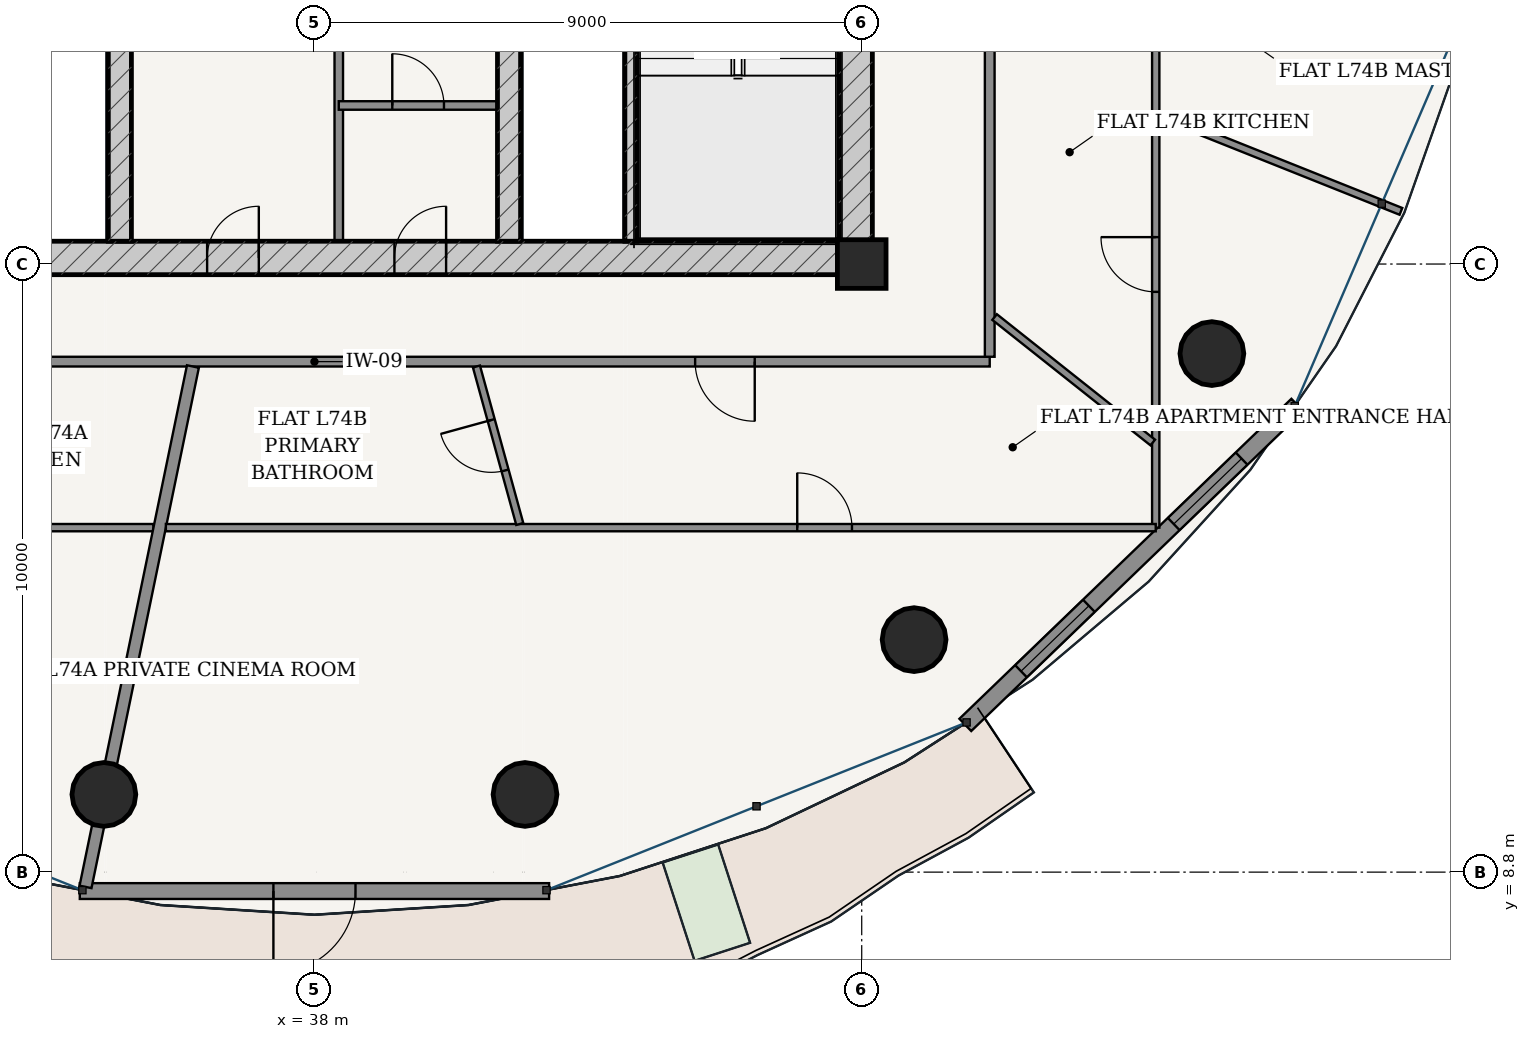
"""IFC4 building model, lengths in metres.
Left out: names, types, materials, properties, quantities, classifications, styles, units other than length and angle.
Written with IfcOpenShell. Run it as: python <this file> out.ifc"""

import sys

from ifc_helpers import new_model, si_unit, direction, frame, frame_2d, origin, origin_2d, place, context, subcontext, project, spatial, rectangle, hollow_circle, extrude, source, transform, mapped, element, fill, save


model = new_model("IFC4")
c1 = context("Model", 3, precision=1e-05, world=origin(), true_north=direction((-0.2419218956, 0.970295726276)))
c2 = subcontext(c1, "Body", "Model", "MODEL_VIEW")
j1 = project(units=[si_unit("LENGTHUNIT", "METRE"), si_unit("PLANEANGLEUNIT", "RADIAN")], contexts=[c1])
p1 = place(None, origin())
s1 = spatial("IfcSite", under=j1, at=p1, CompositionType="ELEMENT")
p2 = place(p1, origin())
s2 = spatial("IfcBuilding", under=s1, at=p2, CompositionType="ELEMENT")
p3 = place(p2, frame((0.0, 0.0, 281.95)))
s3 = spatial("IfcBuildingStorey", under=s2, at=p3, CompositionType="ELEMENT", Elevation=281.95)
p4 = place(p3, frame((47.0, 18.8, 0.0), z_axis=(0.0, 0.0, 1.0), x_axis=(1.0, 0.0, 0.0)))
e1 = element("IfcColumn", 1, at=p4, inside=s3, PredefinedType="COLUMN", context=c2, shape_type="SweptSolid", body=[
    extrude(rectangle(XDim=0.8, YDim=0.8, at=origin_2d()), origin(), (0.0, 0.0, 1.0), 3.75),
])
p5 = place(p3, frame((28.825, 18.9, 0.0), z_axis=(0.0, 0.0, 1.0), x_axis=(1.0, 0.0, 0.0)))
e2 = element("IfcWall", 2, at=p5, inside=s3, PredefinedType="SHEAR", context=c2, shape_type="SweptSolid", body=[
    extrude(rectangle(XDim=18.35, YDim=0.55, at=frame_2d((9.175, 0.0))), origin(), (0.0, 0.0, 1.0), 3.49),
])
p6 = place(p5, frame((7.41, 0.0, 0.0)))
e3 = element("IfcOpeningElement", 3, at=p6, cuts=e2, PredefinedType="OPENING", context=c2, shape_type="SweptSolid", body=[
    extrude(rectangle(XDim=0.85, YDim=2.1, at=frame_2d((0.425, 1.05))), frame((0.0, 0.285, 0.0), z_axis=(0.0, -1.0, 0.0), x_axis=(1.0, 0.0, 0.0)), (0.0, 0.0, 1.0), 0.57),
])
p7 = place(p5, frame((10.49, 0.0, 0.0)))
e4 = element("IfcOpeningElement", 4, at=p7, cuts=e2, PredefinedType="OPENING", context=c2, shape_type="SweptSolid", body=[
    extrude(rectangle(XDim=0.85, YDim=2.1, at=frame_2d((0.425, 1.05))), frame((0.0, 0.285, 0.0), z_axis=(0.0, -1.0, 0.0), x_axis=(1.0, 0.0, 0.0)), (0.0, 0.0, 1.0), 0.57),
])
p8 = place(p3, frame((46.9, 19.175, 0.0), z_axis=(0.0, 0.0, 1.0), x_axis=(0.0, 1.0, 0.0)))
e5 = element("IfcWall", 5, at=p8, inside=s3, PredefinedType="SHEAR", context=c2, shape_type="SweptSolid", body=[
    extrude(rectangle(XDim=15.25, YDim=0.55, at=frame_2d((7.625, 0.0))), origin(), (0.0, 0.0, 1.0), 3.49),
])
p9 = place(p8, frame((9.875, 0.0, 0.0)))
e6 = element("IfcOpeningElement", 6, at=p9, cuts=e5, PredefinedType="OPENING", context=c2, shape_type="SweptSolid", body=[
    extrude(rectangle(XDim=1.5, YDim=2.2, at=frame_2d((0.75, 1.1))), frame((0.0, 0.285, 0.0), z_axis=(0.0, -1.0, 0.0), x_axis=(1.0, 0.0, 0.0)), (0.0, 0.0, 1.0), 0.57),
])
p10 = place(p3, frame((43.205, 19.175, 0.0), z_axis=(0.0, 0.0, 1.0), x_axis=(0.0, 1.0, 0.0)))
e7 = element("IfcWall", 7, at=p10, inside=s3, PredefinedType="SOLIDWALL", context=c2, shape_type="SweptSolid", body=[
    extrude(rectangle(XDim=7.375, YDim=0.2, at=frame_2d((3.688, 0.0))), origin(), (0.0, 0.0, 1.0), 3.49),
])
p11 = place(p3, frame((34.8, 19.175, 0.0), z_axis=(0.0, 0.0, 1.0), x_axis=(0.0, 1.0, 0.0)))
e8 = element("IfcWall", 8, at=p11, inside=s3, PredefinedType="SHEAR", context=c2, shape_type="SweptSolid", body=[
    extrude(rectangle(XDim=15.25, YDim=0.38, at=frame_2d((7.625, 0.0))), origin(), (0.0, 0.0, 1.0), 3.49),
])
p12 = place(p11, frame((7.8, 0.0, 0.0)))
e9 = element("IfcOpeningElement", 9, at=p12, cuts=e8, PredefinedType="OPENING", context=c2, shape_type="SweptSolid", body=[
    extrude(rectangle(XDim=1.05, YDim=2.15, at=frame_2d((0.525, 1.075))), frame((0.0, 0.2, 0.0), z_axis=(0.0, -1.0, 0.0), x_axis=(1.0, 0.0, 0.0)), (0.0, 0.0, 1.0), 0.4),
])
p13 = place(p3, frame((41.2, 19.175, 0.0), z_axis=(0.0, 0.0, 1.0), x_axis=(0.0, 1.0, 0.0)))
e10 = element("IfcWall", 10, at=p13, inside=s3, PredefinedType="SHEAR", context=c2, shape_type="SweptSolid", body=[
    extrude(rectangle(XDim=15.25, YDim=0.38, at=frame_2d((7.625, 0.0))), origin(), (0.0, 0.0, 1.0), 3.49),
])
p14 = place(p13, frame((7.8, 0.0, 0.0)))
e11 = element("IfcOpeningElement", 11, at=p14, cuts=e10, PredefinedType="OPENING", context=c2, shape_type="SweptSolid", body=[
    extrude(rectangle(XDim=1.05, YDim=2.15, at=frame_2d((0.525, 1.075))), frame((0.0, 0.2, 0.0), z_axis=(0.0, -1.0, 0.0), x_axis=(1.0, 0.0, 0.0)), (0.0, 0.0, 1.0), 0.4),
])
for number, where, z_axis, x_axis in (
    (12, (34.537, 10.078, 0.0), (0.0, 0.0, 1.0), (1.0, 0.0, 0.0)),
    (13, (41.463, 10.078, 0.0), (0.0, 0.0, 1.0), (1.0, 0.0, 0.0)),
    (14, (47.861, 12.624, 0.0), (0.0, 0.0, 1.0), (1.0, 0.0, 0.0)),
    (15, (52.759, 17.328, 0.0), (0.0, 0.0, 1.0), (1.0, 0.0, 0.0)),
):
    element("IfcColumn", number, at=place(p3, frame(where, z_axis=z_axis, x_axis=x_axis)), inside=s3, PredefinedType="COLUMN", context=c2, shape_type="SweptSolid", body=[
        extrude(hollow_circle(Radius=0.525, WallThickness=0.035, at=origin_2d()), origin(), (0.0, 0.0, 1.0), 3.75),
    ])
p15 = place(p3, frame((34.141, 8.489, 0.0), z_axis=(0.0, 0.0, 1.0), x_axis=(1.0, 0.0, 0.0)))
e16 = element("IfcWall", 16, at=p15, inside=s3, PredefinedType="SOLIDWALL", context=c2, shape_type="SweptSolid", body=[
    extrude(rectangle(XDim=7.718, YDim=0.26, at=frame_2d((3.859, 0.0))), origin(), (0.0, 0.0, 1.0), 3.49),
])
p16 = place(p15, frame((3.184, 0.0, 0.0)))
e17 = element("IfcOpeningElement", 17, at=p16, cuts=e16, PredefinedType="OPENING", context=c2, shape_type="SweptSolid", body=[
    extrude(rectangle(XDim=1.35, YDim=2.2, at=frame_2d((0.675, 1.1))), frame((0.0, 0.14, 0.0), z_axis=(0.0, -1.0, 0.0), x_axis=(1.0, 0.0, 0.0)), (0.0, 0.0, 1.0), 0.28),
])
p17 = place(p3, frame((48.704, 11.221, 0.0), z_axis=(0.0, 0.0, 1.0), x_axis=(0.719995397366, 0.69397883813, 0.0)))
e18 = element("IfcWall", 18, at=p17, inside=s3, PredefinedType="SOLIDWALL", context=c2, shape_type="SweptSolid", body=[
    extrude(rectangle(XDim=7.582, YDim=0.28, at=frame_2d((3.791, 0.0))), origin(), (0.0, 0.0, 1.0), 3.49),
])
p18 = place(p17, frame((1.272, 0.0, 0.85)))
e19 = element("IfcOpeningElement", 19, at=p18, cuts=e18, PredefinedType="OPENING", context=c2, shape_type="SweptSolid", body=[
    extrude(rectangle(XDim=1.55, YDim=1.95, at=frame_2d((0.775, 0.975))), frame((0.0, 0.15, 0.0), z_axis=(0.0, -1.0, 0.0), x_axis=(1.0, 0.0, 0.0)), (0.0, 0.0, 1.0), 0.3),
])
p19 = place(p17, frame((4.76, 0.0, 0.85)))
e20 = element("IfcOpeningElement", 20, at=p19, cuts=e18, PredefinedType="OPENING", context=c2, shape_type="SweptSolid", body=[
    extrude(rectangle(XDim=1.55, YDim=1.95, at=frame_2d((0.775, 0.975))), frame((0.0, 0.15, 0.0), z_axis=(0.0, -1.0, 0.0), x_axis=(1.0, 0.0, 0.0)), (0.0, 0.0, 1.0), 0.3),
])
p20 = place(p3, frame((38.4, 19.175, 0.0), z_axis=(0.0, 0.0, 1.0), x_axis=(0.0, 1.0, 0.0)))
e21 = element("IfcWall", 21, at=p20, inside=s3, PredefinedType="PARTITIONING", context=c2, shape_type="SweptSolid", body=[
    extrude(rectangle(XDim=4.465, YDim=0.14, at=frame_2d((2.232, 0.0))), origin(), (0.0, 0.0, 1.0), 3.49),
])
p21 = place(p3, frame((38.4, 21.407, 0.0), z_axis=(0.0, 0.0, 1.0), x_axis=(1.0, 0.0, 0.0)))
e22 = element("IfcWall", 22, at=p21, inside=s3, PredefinedType="PARTITIONING", context=c2, shape_type="SweptSolid", body=[
    extrude(rectangle(XDim=2.61, YDim=0.14, at=frame_2d((1.305, 0.0))), origin(), (0.0, 0.0, 1.0), 3.49),
])
p22 = place(p21, frame((0.88, 0.0, 0.0)))
e23 = element("IfcOpeningElement", 23, at=p22, cuts=e22, PredefinedType="OPENING", context=c2, shape_type="SweptSolid", body=[
    extrude(rectangle(XDim=0.85, YDim=2.1, at=frame_2d((0.425, 1.05))), frame((0.0, 0.08, 0.0), z_axis=(0.0, -1.0, 0.0), x_axis=(1.0, 0.0, 0.0)), (0.0, 0.0, 1.0), 0.16),
])
p23 = place(p3, frame((26.895, 17.195, 0.0), z_axis=(0.0, 0.0, 1.0), x_axis=(1.0, 0.0, 0.0)))
e24 = element("IfcWall", 24, at=p23, inside=s3, PredefinedType="PARTITIONING", context=c2, shape_type="SweptSolid", body=[
    extrude(rectangle(XDim=22.21, YDim=0.16, at=frame_2d((11.105, 0.0))), origin(), (0.0, 0.0, 1.0), 3.015),
])
p24 = place(p23, frame((17.365, 0.0, 0.0)))
e25 = element("IfcOpeningElement", 25, at=p24, cuts=e24, PredefinedType="OPENING", context=c2, shape_type="SweptSolid", body=[
    extrude(rectangle(XDim=0.98, YDim=2.2, at=frame_2d((0.49, 1.1))), frame((0.0, 0.09, 0.0), z_axis=(0.0, -1.0, 0.0), x_axis=(1.0, 0.0, 0.0)), (0.0, 0.0, 1.0), 0.18),
])
p25 = place(p3, frame((49.105, 17.275, 0.0), z_axis=(0.0, 0.0, 1.0), x_axis=(0.0, 1.0, 0.0)))
e26 = element("IfcWall", 26, at=p25, inside=s3, PredefinedType="PARTITIONING", context=c2, shape_type="SweptSolid", body=[
    extrude(rectangle(XDim=13.925, YDim=0.16, at=frame_2d((6.962, 0.0))), origin(), (0.0, 0.0, 1.0), 3.015),
])
p26 = place(p3, frame((35.353, 14.465, 0.0), z_axis=(0.0, 0.0, 1.0), x_axis=(-1.0, 0.0, 0.0)))
e27 = element("IfcWall", 27, at=p26, inside=s3, PredefinedType="PARTITIONING", context=c2, shape_type="SweptSolid", body=[
    extrude(rectangle(XDim=11.188, YDim=0.12, at=frame_2d((5.594, 0.0))), origin(), (0.0, 0.0, 1.0), 3.015),
])
p27 = place(p26, frame((3.997, 0.0, 0.0)))
e28 = element("IfcOpeningElement", 28, at=p27, cuts=e27, PredefinedType="OPENING", context=c2, shape_type="SweptSolid", body=[
    extrude(rectangle(XDim=0.9, YDim=2.15, at=frame_2d((0.45, 1.075))), frame((0.0, 0.07, 0.0), z_axis=(0.0, -1.0, 0.0), x_axis=(1.0, 0.0, 0.0)), (0.0, 0.0, 1.0), 0.14),
])
p28 = place(p3, frame((36.001, 17.115, 0.0), z_axis=(0.0, 0.0, 1.0), x_axis=(-0.202108543081, -0.979363128167, 0.0)))
e29 = element("IfcWall", 29, at=p28, inside=s3, PredefinedType="PARTITIONING", context=c2, shape_type="SweptSolid", body=[
    extrude(rectangle(XDim=8.739, YDim=0.2, at=frame_2d((4.369, 0.0))), origin(), (0.0, 0.0, 1.0), 3.015),
])
p29 = place(p3, frame((51.835, 34.01, 0.0), z_axis=(0.0, 0.0, 1.0), x_axis=(0.0, -1.0, 0.0)))
e30 = element("IfcWall", 30, at=p29, inside=s3, PredefinedType="PARTITIONING", context=c2, shape_type="SweptSolid", body=[
    extrude(rectangle(XDim=19.545, YDim=0.12, at=frame_2d((9.772, 0.0))), origin(), (0.0, 0.0, 1.0), 3.015),
])
p30 = place(p29, frame((14.768, 0.0, 0.0)))
e31 = element("IfcOpeningElement", 31, at=p30, cuts=e30, PredefinedType="OPENING", context=c2, shape_type="SweptSolid", body=[
    extrude(rectangle(XDim=0.9, YDim=2.15, at=frame_2d((0.45, 1.075))), frame((0.0, 0.07, 0.0), z_axis=(0.0, -1.0, 0.0), x_axis=(1.0, 0.0, 0.0)), (0.0, 0.0, 1.0), 0.14),
])
p31 = place(p29, frame((8.718, 0.0, 0.0)))
e32 = element("IfcOpeningElement", 32, at=p31, cuts=e30, PredefinedType="OPENING", context=c2, shape_type="SweptSolid", body=[
    extrude(rectangle(XDim=0.9, YDim=2.15, at=frame_2d((0.45, 1.075))), frame((0.0, 0.07, 0.0), z_axis=(0.0, -1.0, 0.0), x_axis=(1.0, 0.0, 0.0)), (0.0, 0.0, 1.0), 0.14),
])
p32 = place(p29, frame((4.14, 0.0, 0.0)))
e33 = element("IfcOpeningElement", 33, at=p32, cuts=e30, PredefinedType="OPENING", context=c2, shape_type="SweptSolid", body=[
    extrude(rectangle(XDim=0.9, YDim=2.15, at=frame_2d((0.45, 1.075))), frame((0.0, 0.07, 0.0), z_axis=(0.0, -1.0, 0.0), x_axis=(1.0, 0.0, 0.0)), (0.0, 0.0, 1.0), 0.14),
])
p33 = place(p3, frame((51.835, 14.465, 0.0), z_axis=(0.0, 0.0, 1.0), x_axis=(-1.0, 0.0, 0.0)))
e34 = element("IfcWall", 34, at=p33, inside=s3, PredefinedType="PARTITIONING", context=c2, shape_type="SweptSolid", body=[
    extrude(rectangle(XDim=16.278, YDim=0.12, at=frame_2d((8.139, 0.0))), origin(), (0.0, 0.0, 1.0), 3.015),
])
p34 = place(p33, frame((4.996, 0.0, 0.0)))
e35 = element("IfcOpeningElement", 35, at=p34, cuts=e34, PredefinedType="OPENING", context=c2, shape_type="SweptSolid", body=[
    extrude(rectangle(XDim=0.9, YDim=2.15, at=frame_2d((0.45, 1.075))), frame((0.0, 0.07, 0.0), z_axis=(0.0, -1.0, 0.0), x_axis=(1.0, 0.0, 0.0)), (0.0, 0.0, 1.0), 0.14),
])
p35 = place(p3, frame((51.893, 21.253, 0.0), z_axis=(0.0, 0.0, 1.0), x_axis=(0.928712556691, -0.370800467966, 0.0)))
e36 = element("IfcWall", 36, at=p35, inside=s3, PredefinedType="PARTITIONING", context=c2, shape_type="SweptSolid", body=[
    extrude(rectangle(XDim=4.28, YDim=0.12, at=frame_2d((2.14, 0.0))), origin(), (0.0, 0.0, 1.0), 3.121),
])
p36 = place(p3, frame((40.664, 17.115, 0.0), z_axis=(0.0, 0.0, 1.0), x_axis=(0.265177604745, -0.964199584081, 0.0)))
e37 = element("IfcWall", 37, at=p36, inside=s3, PredefinedType="PARTITIONING", context=c2, shape_type="SweptSolid", body=[
    extrude(rectangle(XDim=2.687, YDim=0.12, at=frame_2d((1.343, 0.0))), origin(), (0.0, 0.0, 1.0), 3.209),
])
p37 = place(p36, frame((0.913, 0.0, 0.0)))
e38 = element("IfcOpeningElement", 38, at=p37, cuts=e37, PredefinedType="OPENING", context=c2, shape_type="SweptSolid", body=[
    extrude(rectangle(XDim=0.86, YDim=2.15, at=frame_2d((0.43, 1.075))), frame((0.0, 0.07, 0.0), z_axis=(0.0, -1.0, 0.0), x_axis=(1.0, 0.0, 0.0)), (0.0, 0.0, 1.0), 0.14),
])
p38 = place(p3, frame((49.185, 17.928, 0.0), z_axis=(0.0, 0.0, 1.0), x_axis=(0.78348039615, -0.621416501912, 0.0)))
e39 = element("IfcWall", 39, at=p38, inside=s3, PredefinedType="PARTITIONING", context=c2, shape_type="SweptSolid", body=[
    extrude(rectangle(XDim=3.32, YDim=0.12, at=frame_2d((1.66, 0.0))), origin(), (0.0, 0.0, 1.0), 3.121),
])
m1 = source(origin(), c2, "Body", "SweptSolid", [
    extrude(rectangle(XDim=1.35, YDim=2.2, at=frame_2d((0.675, 1.1))), frame((0.0, 0.025, 0.0), z_axis=(0.0, -1.0, 0.0), x_axis=(1.0, 0.0, 0.0)), (0.0, 0.0, 1.0), 0.05),
])
p39 = place(p16, frame((1.35, 0.0, 0.0), z_axis=(0.0, 0.0, 1.0), x_axis=(-1.0, 0.0, 0.0)))
e40 = element("IfcDoor", 40, at=p39, inside=s3, OperationType="SINGLE_SWING_RIGHT", PredefinedType="DOOR", context=c2, shape_type="MappedRepresentation", body=[
    mapped(m1, transform((0.0, 0.0, 0.0), scale=1.0)),
])
fill(e17, e40)
m2 = source(origin(), c2, "Body", "SweptSolid", [
    extrude(rectangle(XDim=1.55, YDim=1.95, at=frame_2d((0.775, 0.975))), frame((0.0, 0.03, 0.0), z_axis=(0.0, -1.0, 0.0), x_axis=(1.0, 0.0, 0.0)), (0.0, 0.0, 1.0), 0.06),
])
p40 = place(p18, origin())
e41 = element("IfcWindow", 41, at=p40, inside=s3, PartitioningType="SINGLE_PANEL", PredefinedType="WINDOW", context=c2, shape_type="MappedRepresentation", body=[
    mapped(m2, transform((0.0, 0.0, 0.0), scale=1.0)),
])
fill(e19, e41)
p41 = place(p19, origin())
e42 = element("IfcWindow", 42, at=p41, inside=s3, PartitioningType="SINGLE_PANEL", PredefinedType="WINDOW", context=c2, shape_type="MappedRepresentation", body=[
    mapped(m2, transform((0.0, 0.0, 0.0), scale=1.0)),
])
fill(e20, e42)
m3 = source(origin(), c2, "Body", "SweptSolid", [
    extrude(rectangle(XDim=0.85, YDim=2.1, at=frame_2d((0.425, 1.05))), frame((0.0, 0.025, 0.0), z_axis=(0.0, -1.0, 0.0), x_axis=(1.0, 0.0, 0.0)), (0.0, 0.0, 1.0), 0.05),
])
p42 = place(p6, origin())
e43 = element("IfcDoor", 43, at=p42, inside=s3, OperationType="SINGLE_SWING_RIGHT", PredefinedType="DOOR", context=c2, shape_type="MappedRepresentation", body=[
    mapped(m3, transform((0.0, 0.0, 0.0), scale=1.0)),
])
fill(e3, e43)
p43 = place(p7, origin())
e44 = element("IfcDoor", 44, at=p43, inside=s3, OperationType="SINGLE_SWING_RIGHT", PredefinedType="DOOR", context=c2, shape_type="MappedRepresentation", body=[
    mapped(m3, transform((0.0, 0.0, 0.0), scale=1.0)),
])
fill(e4, e44)
p44 = place(p22, origin())
e45 = element("IfcDoor", 45, at=p44, inside=s3, OperationType="SINGLE_SWING_LEFT", PredefinedType="DOOR", context=c2, shape_type="MappedRepresentation", body=[
    mapped(m3, transform((0.0, 0.0, 0.0), scale=1.0)),
])
fill(e23, e45)
m4 = source(origin(), c2, "Body", "SweptSolid", [
    extrude(rectangle(XDim=0.98, YDim=2.2, at=frame_2d((0.49, 1.1))), frame((0.0, 0.025, 0.0), z_axis=(0.0, -1.0, 0.0), x_axis=(1.0, 0.0, 0.0)), (0.0, 0.0, 1.0), 0.05),
])
p45 = place(p24, frame((0.98, 0.0, 0.0), z_axis=(0.0, 0.0, 1.0), x_axis=(-1.0, 0.0, 0.0)))
e46 = element("IfcDoor", 46, at=p45, inside=s3, OperationType="SINGLE_SWING_LEFT", PredefinedType="DOOR", context=c2, shape_type="MappedRepresentation", body=[
    mapped(m4, transform((0.0, 0.0, 0.0), scale=1.0)),
])
fill(e25, e46)
m5 = source(origin(), c2, "Body", "SweptSolid", [
    extrude(rectangle(XDim=0.86, YDim=2.15, at=frame_2d((0.43, 1.075))), frame((0.0, 0.025, 0.0), z_axis=(0.0, -1.0, 0.0), x_axis=(1.0, 0.0, 0.0)), (0.0, 0.0, 1.0), 0.05),
])
p46 = place(p37, frame((0.86, 0.0, 0.0), z_axis=(0.0, 0.0, 1.0), x_axis=(-1.0, 0.0, 0.0)))
e47 = element("IfcDoor", 47, at=p46, inside=s3, OperationType="SINGLE_SWING_RIGHT", PredefinedType="DOOR", context=c2, shape_type="MappedRepresentation", body=[
    mapped(m5, transform((0.0, 0.0, 0.0), scale=1.0)),
])
fill(e38, e47)
m6 = source(origin(), c2, "Body", "SweptSolid", [
    extrude(rectangle(XDim=0.9, YDim=2.15, at=frame_2d((0.45, 1.075))), frame((0.0, 0.025, 0.0), z_axis=(0.0, -1.0, 0.0), x_axis=(1.0, 0.0, 0.0)), (0.0, 0.0, 1.0), 0.05),
])
p47 = place(p34, frame((0.9, 0.0, 0.0), z_axis=(0.0, 0.0, 1.0), x_axis=(-1.0, 0.0, 0.0)))
e48 = element("IfcDoor", 48, at=p47, inside=s3, OperationType="SINGLE_SWING_LEFT", PredefinedType="DOOR", context=c2, shape_type="MappedRepresentation", body=[
    mapped(m6, transform((0.0, 0.0, 0.0), scale=1.0)),
])
fill(e35, e48)
p48 = place(p30, frame((0.9, 0.0, 0.0), z_axis=(0.0, 0.0, 1.0), x_axis=(-1.0, 0.0, 0.0)))
e49 = element("IfcDoor", 49, at=p48, inside=s3, OperationType="SINGLE_SWING_RIGHT", PredefinedType="DOOR", context=c2, shape_type="MappedRepresentation", body=[
    mapped(m6, transform((0.0, 0.0, 0.0), scale=1.0)),
])
fill(e31, e49)
save(model, sys.argv[1])
